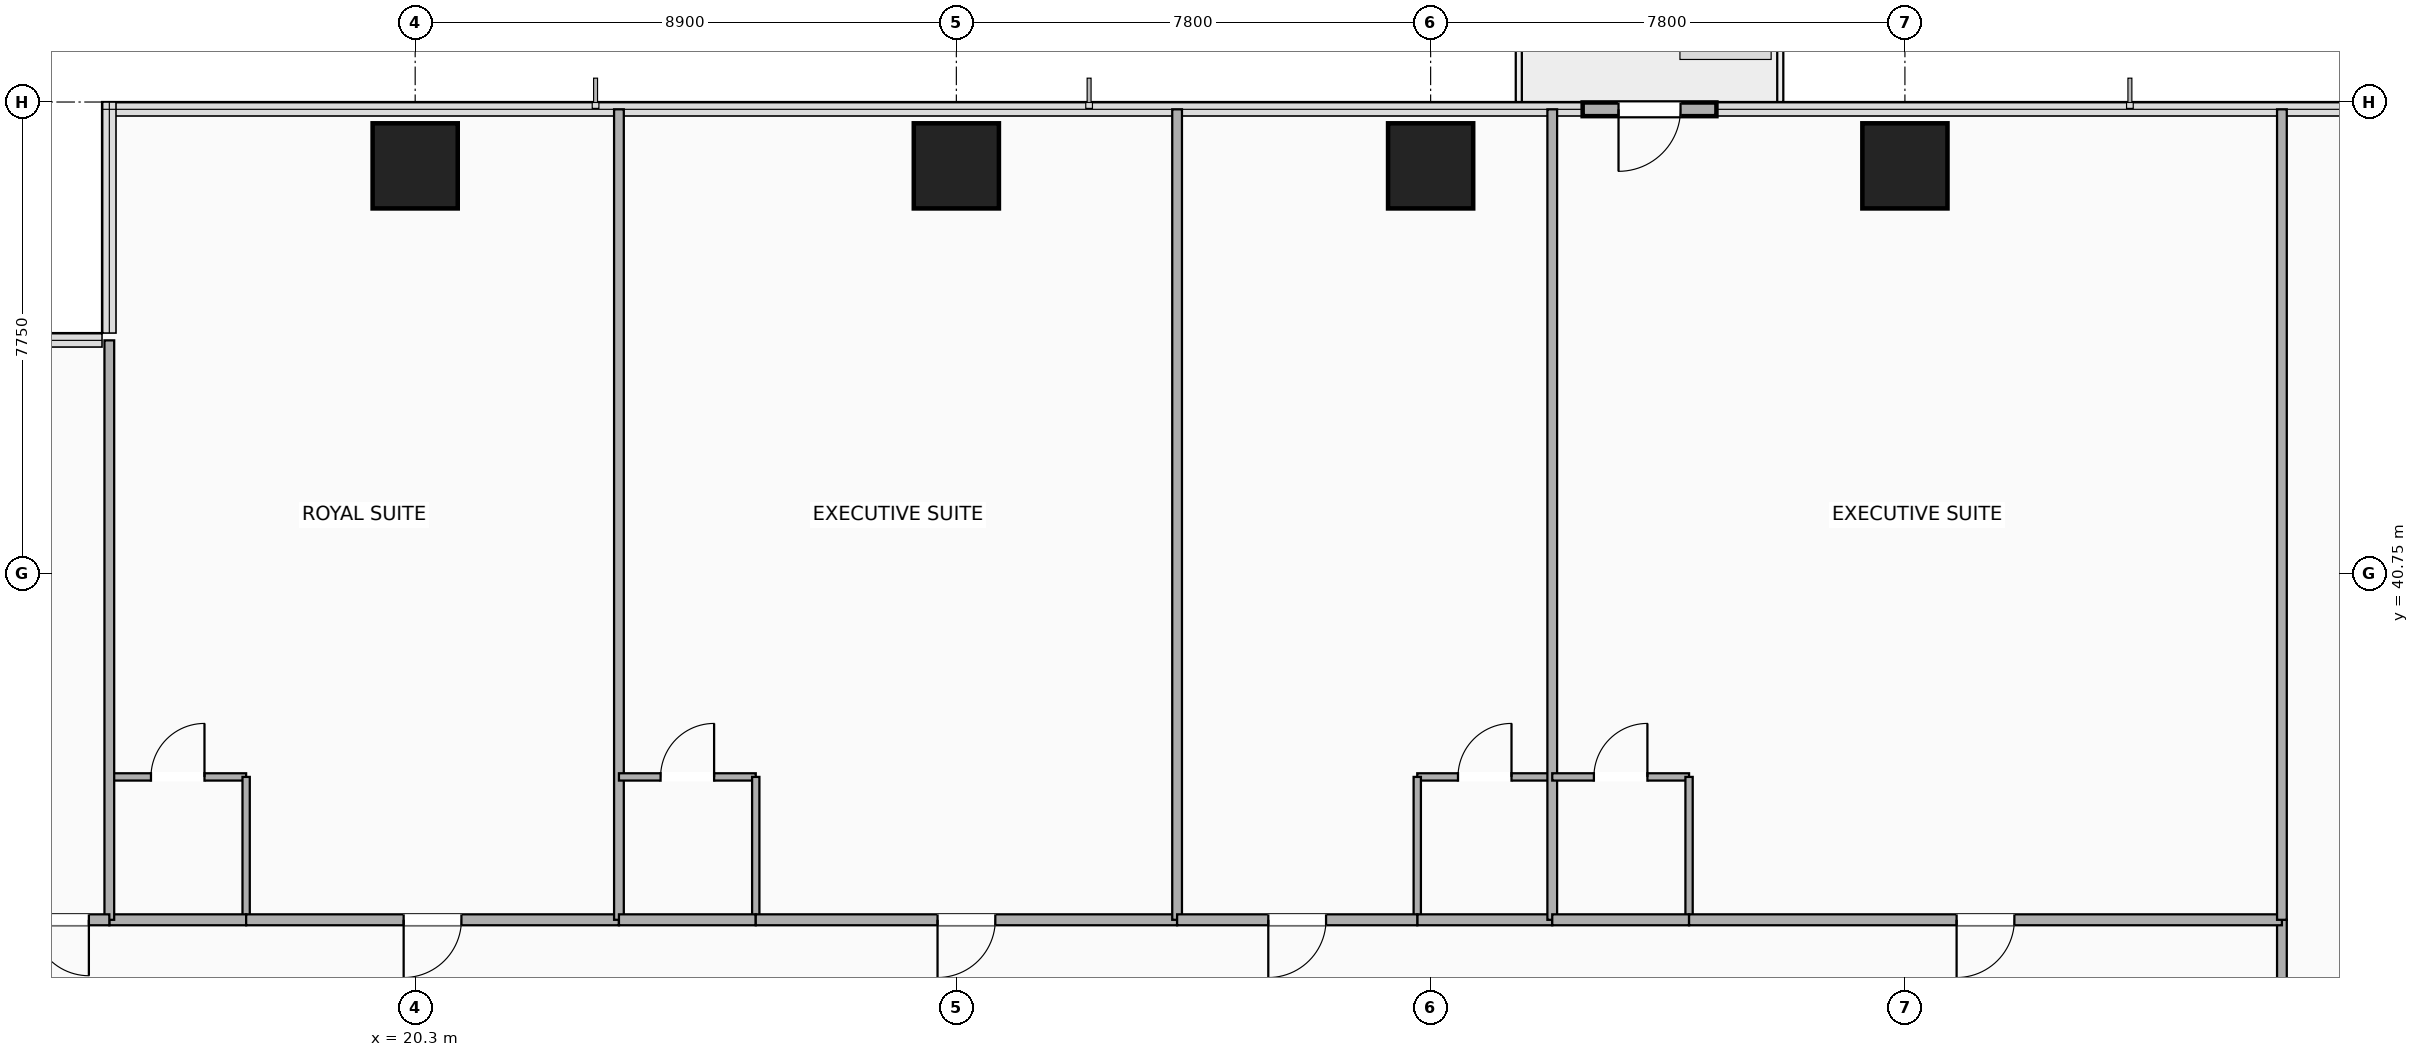
"""IFC4 building model, lengths in metres.
Left out: names, types, materials, properties, quantities, classifications, styles, units other than length and angle.
Written with IfcOpenShell. Run it as: python <this file> out.ifc"""

import sys

from ifc_helpers import new_model, si_unit, direction, frame, frame_2d, origin, origin_2d, place, context, subcontext, project, spatial, rectangle, extrude, element, fill, save


model = new_model("IFC4")
c1 = context("Model", 3, precision=1e-05, world=origin(), true_north=direction((0.0, 1.0)))
c2 = subcontext(c1, "Body", "Model", "MODEL_VIEW")
j1 = project(units=[si_unit("LENGTHUNIT", "METRE"), si_unit("PLANEANGLEUNIT", "RADIAN")], contexts=[c1])
p1 = place(None, origin())
s1 = spatial("IfcSite", under=j1, at=p1, CompositionType="ELEMENT")
p2 = place(p1, origin())
s2 = spatial("IfcBuilding", under=s1, at=p2, CompositionType="ELEMENT")
p3 = place(p2, frame((0.0, 0.0, 64.9)))
s3 = spatial("IfcBuildingStorey", under=s2, at=p3, CompositionType="ELEMENT", Elevation=64.9)
for number, where, z_axis, x_axis in (
    (1, (20.3, 47.45, -0.28), (0.0, 0.0, 1.0), (1.0, 0.0, 0.0)),
    (2, (29.2, 47.45, -0.28), (0.0, 0.0, 1.0), (1.0, 0.0, 0.0)),
    (3, (37.0, 47.45, -0.28), (0.0, 0.0, 1.0), (1.0, 0.0, 0.0)),
    (4, (44.8, 47.45, -0.28), (0.0, 0.0, 1.0), (1.0, 0.0, 0.0)),
):
    element("IfcColumn", number, at=place(p3, frame(where, z_axis=z_axis, x_axis=x_axis)), inside=s3, PredefinedType="COLUMN", context=c2, shape_type="SweptSolid", body=[
        extrude(rectangle(XDim=1.4, YDim=1.4, at=origin_2d()), origin(), (0.0, 0.0, 1.0), 3.5),
    ])
p4 = place(p3, frame((39.5, 48.38, 0.0), z_axis=(0.0, 0.0, 1.0), x_axis=(1.0, 0.0, 0.0)))
e5 = element("IfcWall", 5, at=p4, inside=s3, PredefinedType="SOLIDWALL", context=c2, shape_type="SweptSolid", body=[
    extrude(rectangle(XDim=2.2, YDim=0.225, at=frame_2d((1.1, 0.0))), origin(), (0.0, 0.0, 1.0), 3.22),
])
p5 = place(p4, frame((0.59, 0.0, 0.0)))
e6 = element("IfcOpeningElement", 6, at=p5, cuts=e5, PredefinedType="OPENING", context=c2, shape_type="SweptSolid", body=[
    extrude(rectangle(XDim=1.02, YDim=2.1, at=frame_2d((0.51, 1.05))), frame((0.0, 0.123, 0.0), z_axis=(0.0, -1.0, 0.0), x_axis=(1.0, 0.0, 0.0)), (0.0, 0.0, 1.0), 0.245),
])
p6 = place(p3, frame((51.0, 33.0, 0.0), z_axis=(0.0, 0.0, 1.0), x_axis=(0.0, 1.0, 0.0)))
e7 = element("IfcWall", 7, at=p6, inside=s3, PredefinedType="PARTITIONING", context=c2, shape_type="SweptSolid", body=[
    extrude(rectangle(XDim=2.05, YDim=0.16, at=frame_2d((1.025, 0.0))), origin(), (0.0, 0.0, 1.0), 2.51),
])
p7 = place(p3, frame((15.27, 37.4, 0.0), z_axis=(0.0, 0.0, 1.0), x_axis=(1.0, 0.0, 0.0)))
e8 = element("IfcWall", 8, at=p7, inside=s3, PredefinedType="PARTITIONING", context=c2, shape_type="SweptSolid", body=[
    extrude(rectangle(XDim=2.25, YDim=0.12, at=frame_2d((1.125, 0.0))), origin(), (0.0, 0.0, 1.0), 3.22),
])
p8 = place(p7, frame((1.565, 0.0, 0.0), z_axis=(0.0, 0.0, 1.0), x_axis=(-1.0, 0.0, 0.0)))
e9 = element("IfcOpeningElement", 9, at=p8, cuts=e8, PredefinedType="OPENING", context=c2, shape_type="SweptSolid", body=[
    extrude(rectangle(XDim=0.88, YDim=2.08, at=frame_2d((0.44, 1.04))), frame((0.0, 0.07, 0.0), z_axis=(0.0, -1.0, 0.0), x_axis=(1.0, 0.0, 0.0)), (0.0, 0.0, 1.0), 0.14),
])
p9 = place(p3, frame((17.52, 35.05, 0.0), z_axis=(0.0, 0.0, 1.0), x_axis=(0.0, 1.0, 0.0)))
e10 = element("IfcWall", 10, at=p9, inside=s3, PredefinedType="PARTITIONING", context=c2, shape_type="SweptSolid", body=[
    extrude(rectangle(XDim=2.35, YDim=0.12, at=frame_2d((1.175, 0.0))), origin(), (0.0, 0.0, 1.0), 3.22),
])
p10 = place(p3, frame((15.27, 35.05, 0.0), z_axis=(0.0, 0.0, 1.0), x_axis=(1.0, 0.0, 0.0)))
e11 = element("IfcWall", 11, at=p10, inside=s3, PredefinedType="PARTITIONING", context=c2, shape_type="SweptSolid", body=[
    extrude(rectangle(XDim=2.25, YDim=0.18, at=frame_2d((1.125, 0.0))), origin(), (0.0, 0.0, 1.0), 3.22),
])
p11 = place(p3, frame((17.52, 35.05, 0.0), z_axis=(0.0, 0.0, 1.0), x_axis=(1.0, 0.0, 0.0)))
e12 = element("IfcWall", 12, at=p11, inside=s3, PredefinedType="PARTITIONING", context=c2, shape_type="SweptSolid", body=[
    extrude(rectangle(XDim=6.131, YDim=0.18, at=frame_2d((3.065, 0.0))), origin(), (0.0, 0.0, 1.0), 2.51),
])
p12 = place(p11, frame((2.591, 0.0, 0.0)))
e13 = element("IfcOpeningElement", 13, at=p12, cuts=e12, PredefinedType="OPENING", context=c2, shape_type="SweptSolid", body=[
    extrude(rectangle(XDim=0.95, YDim=2.15, at=frame_2d((0.475, 1.075))), frame((0.0, 0.1, 0.0), z_axis=(0.0, -1.0, 0.0), x_axis=(1.0, 0.0, 0.0)), (0.0, 0.0, 1.0), 0.2),
])
p13 = place(p3, frame((15.27, 35.05, 0.0), z_axis=(0.0, 0.0, 1.0), x_axis=(0.0, 1.0, 0.0)))
e14 = element("IfcWall", 14, at=p13, inside=s3, PredefinedType="PARTITIONING", context=c2, shape_type="SweptSolid", body=[
    extrude(rectangle(XDim=9.53, YDim=0.16, at=frame_2d((4.765, 0.0))), origin(), (0.0, 0.0, 1.0), 3.22),
])
p14 = place(p3, frame((23.651, 35.05, 0.0), z_axis=(0.0, 0.0, 1.0), x_axis=(0.0, 1.0, 0.0)))
e15 = element("IfcWall", 15, at=p14, inside=s3, PredefinedType="PARTITIONING", context=c2, shape_type="SweptSolid", body=[
    extrude(rectangle(XDim=13.33, YDim=0.16, at=frame_2d((6.665, 0.0))), origin(), (0.0, 0.0, 1.0), 2.583),
])
p15 = place(p3, frame((23.651, 37.4, 0.0), z_axis=(0.0, 0.0, 1.0), x_axis=(1.0, 0.0, 0.0)))
e16 = element("IfcWall", 16, at=p15, inside=s3, PredefinedType="PARTITIONING", context=c2, shape_type="SweptSolid", body=[
    extrude(rectangle(XDim=2.25, YDim=0.12, at=frame_2d((1.125, 0.0))), origin(), (0.0, 0.0, 1.0), 3.22),
])
p16 = place(p15, frame((1.565, 0.0, 0.0), z_axis=(0.0, 0.0, 1.0), x_axis=(-1.0, 0.0, 0.0)))
e17 = element("IfcOpeningElement", 17, at=p16, cuts=e16, PredefinedType="OPENING", context=c2, shape_type="SweptSolid", body=[
    extrude(rectangle(XDim=0.88, YDim=2.08, at=frame_2d((0.44, 1.04))), frame((0.0, 0.07, 0.0), z_axis=(0.0, -1.0, 0.0), x_axis=(1.0, 0.0, 0.0)), (0.0, 0.0, 1.0), 0.14),
])
p17 = place(p3, frame((25.901, 35.05, 0.0), z_axis=(0.0, 0.0, 1.0), x_axis=(0.0, 1.0, 0.0)))
e18 = element("IfcWall", 18, at=p17, inside=s3, PredefinedType="PARTITIONING", context=c2, shape_type="SweptSolid", body=[
    extrude(rectangle(XDim=2.35, YDim=0.12, at=frame_2d((1.175, 0.0))), origin(), (0.0, 0.0, 1.0), 2.902),
])
p18 = place(p3, frame((23.651, 35.05, 0.0), z_axis=(0.0, 0.0, 1.0), x_axis=(1.0, 0.0, 0.0)))
e19 = element("IfcWall", 19, at=p18, inside=s3, PredefinedType="PARTITIONING", context=c2, shape_type="SweptSolid", body=[
    extrude(rectangle(XDim=2.25, YDim=0.18, at=frame_2d((1.125, 0.0))), origin(), (0.0, 0.0, 1.0), 3.22),
])
p19 = place(p3, frame((25.901, 35.05, 0.0), z_axis=(0.0, 0.0, 1.0), x_axis=(1.0, 0.0, 0.0)))
e20 = element("IfcWall", 20, at=p19, inside=s3, PredefinedType="PARTITIONING", context=c2, shape_type="SweptSolid", body=[
    extrude(rectangle(XDim=6.929, YDim=0.18, at=frame_2d((3.465, 0.0))), origin(), (0.0, 0.0, 1.0), 2.51),
])
p20 = place(p19, frame((2.99, 0.0, 0.0)))
e21 = element("IfcOpeningElement", 21, at=p20, cuts=e20, PredefinedType="OPENING", context=c2, shape_type="SweptSolid", body=[
    extrude(rectangle(XDim=0.95, YDim=2.15, at=frame_2d((0.475, 1.075))), frame((0.0, 0.1, 0.0), z_axis=(0.0, -1.0, 0.0), x_axis=(1.0, 0.0, 0.0)), (0.0, 0.0, 1.0), 0.2),
])
p21 = place(p3, frame((32.83, 35.05, 0.0), z_axis=(0.0, 0.0, 1.0), x_axis=(0.0, 1.0, 0.0)))
e22 = element("IfcWall", 22, at=p21, inside=s3, PredefinedType="PARTITIONING", context=c2, shape_type="SweptSolid", body=[
    extrude(rectangle(XDim=13.33, YDim=0.16, at=frame_2d((6.665, 0.0))), origin(), (0.0, 0.0, 1.0), 2.583),
])
p22 = place(p3, frame((36.78, 37.4, 0.0), z_axis=(0.0, 0.0, 1.0), x_axis=(1.0, 0.0, 0.0)))
e23 = element("IfcWall", 23, at=p22, inside=s3, PredefinedType="PARTITIONING", context=c2, shape_type="SweptSolid", body=[
    extrude(rectangle(XDim=2.22, YDim=0.12, at=frame_2d((1.11, 0.0))), origin(), (0.0, 0.0, 1.0), 2.51),
])
p23 = place(p22, frame((1.55, 0.0, 0.0), z_axis=(0.0, 0.0, 1.0), x_axis=(-1.0, 0.0, 0.0)))
e24 = element("IfcOpeningElement", 24, at=p23, cuts=e23, PredefinedType="OPENING", context=c2, shape_type="SweptSolid", body=[
    extrude(rectangle(XDim=0.88, YDim=2.08, at=frame_2d((0.44, 1.04))), frame((0.0, 0.07, 0.0), z_axis=(0.0, -1.0, 0.0), x_axis=(1.0, 0.0, 0.0)), (0.0, 0.0, 1.0), 0.14),
])
p24 = place(p3, frame((36.78, 35.05, 0.0), z_axis=(0.0, 0.0, 1.0), x_axis=(0.0, 1.0, 0.0)))
e25 = element("IfcWall", 25, at=p24, inside=s3, PredefinedType="PARTITIONING", context=c2, shape_type="SweptSolid", body=[
    extrude(rectangle(XDim=2.35, YDim=0.12, at=frame_2d((1.175, 0.0))), origin(), (0.0, 0.0, 1.0), 2.51),
])
p25 = place(p3, frame((36.78, 35.05, 0.0), z_axis=(0.0, 0.0, 1.0), x_axis=(1.0, 0.0, 0.0)))
e26 = element("IfcWall", 26, at=p25, inside=s3, PredefinedType="PARTITIONING", context=c2, shape_type="SweptSolid", body=[
    extrude(rectangle(XDim=2.22, YDim=0.18, at=frame_2d((1.11, 0.0))), origin(), (0.0, 0.0, 1.0), 2.51),
])
p26 = place(p3, frame((32.83, 35.05, 0.0), z_axis=(0.0, 0.0, 1.0), x_axis=(1.0, 0.0, 0.0)))
e27 = element("IfcWall", 27, at=p26, inside=s3, PredefinedType="PARTITIONING", context=c2, shape_type="SweptSolid", body=[
    extrude(rectangle(XDim=3.95, YDim=0.18, at=frame_2d((1.975, 0.0))), origin(), (0.0, 0.0, 1.0), 2.51),
])
p27 = place(p26, frame((1.5, 0.0, 0.0)))
e28 = element("IfcOpeningElement", 28, at=p27, cuts=e27, PredefinedType="OPENING", context=c2, shape_type="SweptSolid", body=[
    extrude(rectangle(XDim=0.95, YDim=2.15, at=frame_2d((0.475, 1.075))), frame((0.0, 0.1, 0.0), z_axis=(0.0, -1.0, 0.0), x_axis=(1.0, 0.0, 0.0)), (0.0, 0.0, 1.0), 0.2),
])
p28 = place(p3, frame((39.0, 35.05, 0.0), z_axis=(0.0, 0.0, 1.0), x_axis=(0.0, 1.0, 0.0)))
e29 = element("IfcWall", 29, at=p28, inside=s3, PredefinedType="PARTITIONING", context=c2, shape_type="SweptSolid", body=[
    extrude(rectangle(XDim=13.33, YDim=0.16, at=frame_2d((6.665, 0.0))), origin(), (0.0, 0.0, 1.0), 2.583),
])
p29 = place(p3, frame((39.0, 37.4, 0.0), z_axis=(0.0, 0.0, 1.0), x_axis=(1.0, 0.0, 0.0)))
e30 = element("IfcWall", 30, at=p29, inside=s3, PredefinedType="PARTITIONING", context=c2, shape_type="SweptSolid", body=[
    extrude(rectangle(XDim=2.25, YDim=0.12, at=frame_2d((1.125, 0.0))), origin(), (0.0, 0.0, 1.0), 3.22),
])
p30 = place(p29, frame((1.565, 0.0, 0.0), z_axis=(0.0, 0.0, 1.0), x_axis=(-1.0, 0.0, 0.0)))
e31 = element("IfcOpeningElement", 31, at=p30, cuts=e30, PredefinedType="OPENING", context=c2, shape_type="SweptSolid", body=[
    extrude(rectangle(XDim=0.88, YDim=2.08, at=frame_2d((0.44, 1.04))), frame((0.0, 0.07, 0.0), z_axis=(0.0, -1.0, 0.0), x_axis=(1.0, 0.0, 0.0)), (0.0, 0.0, 1.0), 0.14),
])
p31 = place(p3, frame((41.25, 35.05, 0.0), z_axis=(0.0, 0.0, 1.0), x_axis=(0.0, 1.0, 0.0)))
e32 = element("IfcWall", 32, at=p31, inside=s3, PredefinedType="PARTITIONING", context=c2, shape_type="SweptSolid", body=[
    extrude(rectangle(XDim=2.35, YDim=0.12, at=frame_2d((1.175, 0.0))), origin(), (0.0, 0.0, 1.0), 2.902),
])
p32 = place(p3, frame((39.0, 35.05, 0.0), z_axis=(0.0, 0.0, 1.0), x_axis=(1.0, 0.0, 0.0)))
e33 = element("IfcWall", 33, at=p32, inside=s3, PredefinedType="PARTITIONING", context=c2, shape_type="SweptSolid", body=[
    extrude(rectangle(XDim=2.25, YDim=0.18, at=frame_2d((1.125, 0.0))), origin(), (0.0, 0.0, 1.0), 3.22),
])
p33 = place(p3, frame((41.25, 35.05, 0.0), z_axis=(0.0, 0.0, 1.0), x_axis=(1.0, 0.0, 0.0)))
e34 = element("IfcWall", 34, at=p33, inside=s3, PredefinedType="PARTITIONING", context=c2, shape_type="SweptSolid", body=[
    extrude(rectangle(XDim=9.75, YDim=0.18, at=frame_2d((4.875, 0.0))), origin(), (0.0, 0.0, 1.0), 2.51),
])
p34 = place(p33, frame((4.4, 0.0, 0.0)))
e35 = element("IfcOpeningElement", 35, at=p34, cuts=e34, PredefinedType="OPENING", context=c2, shape_type="SweptSolid", body=[
    extrude(rectangle(XDim=0.95, YDim=2.15, at=frame_2d((0.475, 1.075))), frame((0.0, 0.1, 0.0), z_axis=(0.0, -1.0, 0.0), x_axis=(1.0, 0.0, 0.0)), (0.0, 0.0, 1.0), 0.2),
])
p35 = place(p3, frame((51.0, 35.05, 0.0), z_axis=(0.0, 0.0, 1.0), x_axis=(0.0, 1.0, 0.0)))
e36 = element("IfcWall", 36, at=p35, inside=s3, PredefinedType="PARTITIONING", context=c2, shape_type="SweptSolid", body=[
    extrude(rectangle(XDim=13.33, YDim=0.16, at=frame_2d((6.665, 0.0))), origin(), (0.0, 0.0, 1.0), 3.22),
])
p36 = place(p3, frame((11.47, 35.05, 0.0), z_axis=(0.0, 0.0, 1.0), x_axis=(1.0, 0.0, 0.0)))
e37 = element("IfcWall", 37, at=p36, inside=s3, PredefinedType="PARTITIONING", context=c2, shape_type="SweptSolid", body=[
    extrude(rectangle(XDim=3.8, YDim=0.18, at=frame_2d((1.9, 0.0))), origin(), (0.0, 0.0, 1.0), 3.22),
])
p37 = place(p36, frame((2.544, 0.0, 0.0)))
e38 = element("IfcOpeningElement", 38, at=p37, cuts=e37, PredefinedType="OPENING", context=c2, shape_type="SweptSolid", body=[
    extrude(rectangle(XDim=0.92, YDim=2.08, at=frame_2d((0.46, 1.04))), frame((0.0, 0.1, 0.0), z_axis=(0.0, -1.0, 0.0), x_axis=(1.0, 0.0, 0.0)), (0.0, 0.0, 1.0), 0.2),
])
p38 = place(p5, origin())
e39 = element("IfcDoor", 39, at=p38, inside=s3, OperationType="SINGLE_SWING_LEFT", PredefinedType="DOOR", context=c2, shape_type="SweptSolid", body=[
    extrude(rectangle(XDim=1.02, YDim=2.1, at=frame_2d((0.51, 1.05))), frame((0.0, 0.025, 0.0), z_axis=(0.0, -1.0, 0.0), x_axis=(1.0, 0.0, 0.0)), (0.0, 0.0, 1.0), 0.05),
])
fill(e6, e39)
p39 = place(p8, origin())
e40 = element("IfcDoor", 40, at=p39, inside=s3, OperationType="SINGLE_SWING_RIGHT", PredefinedType="DOOR", context=c2, shape_type="SweptSolid", body=[
    extrude(rectangle(XDim=0.88, YDim=2.08, at=frame_2d((0.44, 1.04))), frame((0.0, 0.025, 0.0), z_axis=(0.0, -1.0, 0.0), x_axis=(1.0, 0.0, 0.0)), (0.0, 0.0, 1.0), 0.05),
])
fill(e9, e40)
p40 = place(p12, origin())
e41 = element("IfcDoor", 41, at=p40, inside=s3, OperationType="SINGLE_SWING_LEFT", PredefinedType="DOOR", context=c2, shape_type="SweptSolid", body=[
    extrude(rectangle(XDim=0.95, YDim=2.15, at=frame_2d((0.475, 1.075))), frame((0.0, 0.025, 0.0), z_axis=(0.0, -1.0, 0.0), x_axis=(1.0, 0.0, 0.0)), (0.0, 0.0, 1.0), 0.05),
])
fill(e13, e41)
p41 = place(p16, origin())
e42 = element("IfcDoor", 42, at=p41, inside=s3, OperationType="SINGLE_SWING_RIGHT", PredefinedType="DOOR", context=c2, shape_type="SweptSolid", body=[
    extrude(rectangle(XDim=0.88, YDim=2.08, at=frame_2d((0.44, 1.04))), frame((0.0, 0.025, 0.0), z_axis=(0.0, -1.0, 0.0), x_axis=(1.0, 0.0, 0.0)), (0.0, 0.0, 1.0), 0.05),
])
fill(e17, e42)
p42 = place(p20, origin())
e43 = element("IfcDoor", 43, at=p42, inside=s3, OperationType="SINGLE_SWING_LEFT", PredefinedType="DOOR", context=c2, shape_type="SweptSolid", body=[
    extrude(rectangle(XDim=0.95, YDim=2.15, at=frame_2d((0.475, 1.075))), frame((0.0, 0.025, 0.0), z_axis=(0.0, -1.0, 0.0), x_axis=(1.0, 0.0, 0.0)), (0.0, 0.0, 1.0), 0.05),
])
fill(e21, e43)
p43 = place(p23, origin())
e44 = element("IfcDoor", 44, at=p43, inside=s3, OperationType="SINGLE_SWING_RIGHT", PredefinedType="DOOR", context=c2, shape_type="SweptSolid", body=[
    extrude(rectangle(XDim=0.88, YDim=2.08, at=frame_2d((0.44, 1.04))), frame((0.0, 0.025, 0.0), z_axis=(0.0, -1.0, 0.0), x_axis=(1.0, 0.0, 0.0)), (0.0, 0.0, 1.0), 0.05),
])
fill(e24, e44)
p44 = place(p27, origin())
e45 = element("IfcDoor", 45, at=p44, inside=s3, OperationType="SINGLE_SWING_LEFT", PredefinedType="DOOR", context=c2, shape_type="SweptSolid", body=[
    extrude(rectangle(XDim=0.95, YDim=2.15, at=frame_2d((0.475, 1.075))), frame((0.0, 0.025, 0.0), z_axis=(0.0, -1.0, 0.0), x_axis=(1.0, 0.0, 0.0)), (0.0, 0.0, 1.0), 0.05),
])
fill(e28, e45)
p45 = place(p30, origin())
e46 = element("IfcDoor", 46, at=p45, inside=s3, OperationType="SINGLE_SWING_RIGHT", PredefinedType="DOOR", context=c2, shape_type="SweptSolid", body=[
    extrude(rectangle(XDim=0.88, YDim=2.08, at=frame_2d((0.44, 1.04))), frame((0.0, 0.025, 0.0), z_axis=(0.0, -1.0, 0.0), x_axis=(1.0, 0.0, 0.0)), (0.0, 0.0, 1.0), 0.05),
])
fill(e31, e46)
p46 = place(p34, origin())
e47 = element("IfcDoor", 47, at=p46, inside=s3, OperationType="SINGLE_SWING_LEFT", PredefinedType="DOOR", context=c2, shape_type="SweptSolid", body=[
    extrude(rectangle(XDim=0.95, YDim=2.15, at=frame_2d((0.475, 1.075))), frame((0.0, 0.025, 0.0), z_axis=(0.0, -1.0, 0.0), x_axis=(1.0, 0.0, 0.0)), (0.0, 0.0, 1.0), 0.05),
])
fill(e35, e47)
p47 = place(p37, origin())
e48 = element("IfcDoor", 48, at=p47, inside=s3, OperationType="SINGLE_SWING_RIGHT", PredefinedType="DOOR", context=c2, shape_type="SweptSolid", body=[
    extrude(rectangle(XDim=0.92, YDim=2.08, at=frame_2d((0.46, 1.04))), frame((0.0, 0.025, 0.0), z_axis=(0.0, -1.0, 0.0), x_axis=(1.0, 0.0, 0.0)), (0.0, 0.0, 1.0), 0.05),
])
fill(e38, e48)
save(model, sys.argv[1])
